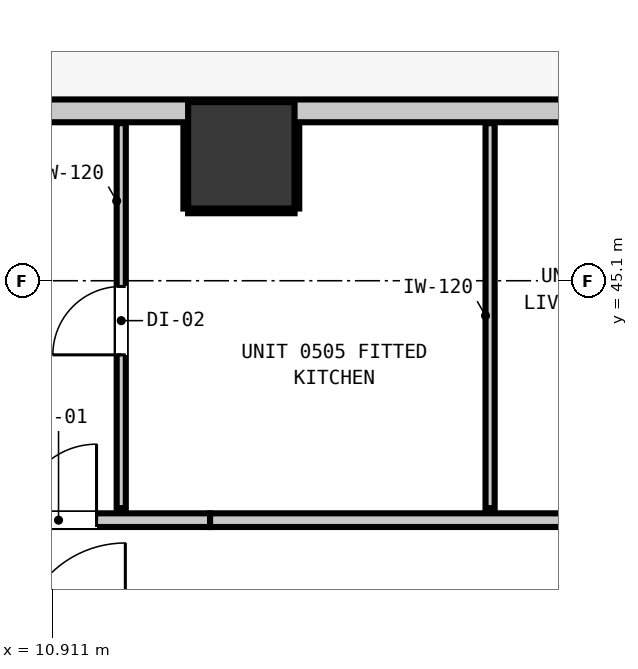
"""IFC4 building model, lengths in metres.
Left out: names, types, materials, properties, quantities, classifications, styles, units other than length and angle.
Written with IfcOpenShell. Run it as: python <this file> out.ifc"""

import sys

from ifc_helpers import new_model, si_unit, direction, frame, frame_2d, origin, origin_2d, place, context, subcontext, project, spatial, rectangle, extrude, element, fill, save


model = new_model("IFC4")
c1 = context("Model", 3, precision=1e-05, world=origin(), true_north=direction((0.0, 1.0)))
c2 = subcontext(c1, "Body", "Model", "MODEL_VIEW")
j1 = project(units=[si_unit("LENGTHUNIT", "METRE"), si_unit("PLANEANGLEUNIT", "RADIAN")], contexts=[c1])
p1 = place(None, origin())
s1 = spatial("IfcSite", under=j1, at=p1, CompositionType="ELEMENT")
p2 = place(p1, origin())
s2 = spatial("IfcBuilding", under=s1, at=p2, CompositionType="ELEMENT")
p3 = place(p2, frame((0.0, 0.0, 22.0)))
s3 = spatial("IfcBuildingStorey", under=s2, at=p3, CompositionType="ELEMENT", Elevation=22.0)
p4 = place(p3, frame((13.4, 46.75, -0.2), z_axis=(0.0, 0.0, 1.0), x_axis=(1.0, 0.0, 0.0)))
e1 = element("IfcColumn", 1, at=p4, inside=s3, PredefinedType="COLUMN", context=c2, shape_type="SweptSolid", body=[
    extrude(rectangle(XDim=1.4, YDim=1.4, at=origin_2d()), origin(), (0.0, 0.0, 1.0), 3.52),
])
p5 = place(p3, frame((4.165, 47.335, 0.0), z_axis=(0.0, 0.0, 1.0), x_axis=(1.0, 0.0, 0.0)))
e2 = element("IfcWall", 2, at=p5, inside=s3, PredefinedType="STANDARD", context=c2, shape_type="SweptSolid", body=[
    extrude(rectangle(XDim=37.47, YDim=0.3, at=frame_2d((18.735, 0.0))), origin(), (0.0, 0.0, 1.0), 3.06),
])
p6 = place(p5, frame((0.501, 0.0, 0.0)))
e3 = element("IfcOpeningElement", 3, at=p6, cuts=e2, PredefinedType="OPENING", context=c2, shape_type="SweptSolid", body=[
    extrude(rectangle(XDim=1.1, YDim=2.15, at=frame_2d((0.55, 1.075))), frame((0.0, 0.16, 0.0), z_axis=(0.0, -1.0, 0.0), x_axis=(1.0, 0.0, 0.0)), (0.0, 0.0, 1.0), 0.32),
])
p7 = place(p5, frame((4.543, 0.0, 0.85)))
e4 = element("IfcOpeningElement", 4, at=p7, cuts=e2, PredefinedType="OPENING", context=c2, shape_type="SweptSolid", body=[
    extrude(rectangle(XDim=1.05, YDim=1.65, at=frame_2d((0.525, 0.825))), frame((0.0, 0.16, 0.0), z_axis=(0.0, -1.0, 0.0), x_axis=(1.0, 0.0, 0.0)), (0.0, 0.0, 1.0), 0.32),
])
p8 = place(p5, frame((13.746, 0.0, 0.85)))
e5 = element("IfcOpeningElement", 5, at=p8, cuts=e2, PredefinedType="OPENING", context=c2, shape_type="SweptSolid", body=[
    extrude(rectangle(XDim=1.05, YDim=1.65, at=frame_2d((0.525, 0.825))), frame((0.0, 0.16, 0.0), z_axis=(0.0, -1.0, 0.0), x_axis=(1.0, 0.0, 0.0)), (0.0, 0.0, 1.0), 0.32),
])
p9 = place(p5, frame((29.575, 0.0, 0.85)))
e6 = element("IfcOpeningElement", 6, at=p9, cuts=e2, PredefinedType="OPENING", context=c2, shape_type="SweptSolid", body=[
    extrude(rectangle(XDim=1.05, YDim=1.65, at=frame_2d((0.525, 0.825))), frame((0.0, 0.16, 0.0), z_axis=(0.0, -1.0, 0.0), x_axis=(1.0, 0.0, 0.0)), (0.0, 0.0, 1.0), 0.32),
])
p10 = place(p5, frame((26.524, 0.0, 0.85)))
e7 = element("IfcOpeningElement", 7, at=p10, cuts=e2, PredefinedType="OPENING", context=c2, shape_type="SweptSolid", body=[
    extrude(rectangle(XDim=1.05, YDim=1.65, at=frame_2d((0.525, 0.825))), frame((0.0, 0.16, 0.0), z_axis=(0.0, -1.0, 0.0), x_axis=(1.0, 0.0, 0.0)), (0.0, 0.0, 1.0), 0.32),
])
p11 = place(p3, frame((2.661, 41.95, 0.0), z_axis=(0.0, 0.0, 1.0), x_axis=(1.0, 0.0, 0.0)))
e8 = element("IfcWall", 8, at=p11, inside=s3, PredefinedType="PARTITIONING", context=c2, shape_type="SweptSolid", body=[
    extrude(rectangle(XDim=10.328, YDim=0.18, at=frame_2d((5.164, 0.0))), origin(), (0.0, 0.0, 1.0), 2.445),
])
p12 = place(p11, frame((7.834, 0.0, 0.0)))
e9 = element("IfcOpeningElement", 9, at=p12, cuts=e8, PredefinedType="OPENING", context=c2, shape_type="SweptSolid", body=[
    extrude(rectangle(XDim=1.0, YDim=2.15, at=frame_2d((0.5, 1.075))), frame((0.0, 0.1, 0.0), z_axis=(0.0, -1.0, 0.0), x_axis=(1.0, 0.0, 0.0)), (0.0, 0.0, 1.0), 0.2),
])
p13 = place(p3, frame((12.989, 41.95, 0.0), z_axis=(0.0, 0.0, 1.0), x_axis=(1.0, 0.0, 0.0)))
e10 = element("IfcWall", 10, at=p13, inside=s3, PredefinedType="PARTITIONING", context=c2, shape_type="SweptSolid", body=[
    extrude(rectangle(XDim=30.984, YDim=0.18, at=frame_2d((15.492, 0.0))), origin(), (0.0, 0.0, 1.0), 3.06),
])
p14 = place(p13, frame((6.307, 0.0, 0.0)))
e11 = element("IfcOpeningElement", 11, at=p14, cuts=e10, PredefinedType="OPENING", context=c2, shape_type="SweptSolid", body=[
    extrude(rectangle(XDim=1.0, YDim=2.15, at=frame_2d((0.5, 1.075))), frame((0.0, 0.1, 0.0), z_axis=(0.0, -1.0, 0.0), x_axis=(1.0, 0.0, 0.0)), (0.0, 0.0, 1.0), 0.2),
])
p15 = place(p13, frame((22.601, 0.0, 0.0)))
e12 = element("IfcOpeningElement", 12, at=p15, cuts=e10, PredefinedType="OPENING", context=c2, shape_type="SweptSolid", body=[
    extrude(rectangle(XDim=1.0, YDim=2.15, at=frame_2d((0.5, 1.075))), frame((0.0, 0.1, 0.0), z_axis=(0.0, -1.0, 0.0), x_axis=(1.0, 0.0, 0.0)), (0.0, 0.0, 1.0), 0.2),
])
p16 = place(p3, frame((11.82, 42.108, 0.0), z_axis=(0.0, 0.0, 1.0), x_axis=(0.0, 1.0, 0.0)))
e13 = element("IfcWall", 13, at=p16, inside=s3, PredefinedType="PARTITIONING", context=c2, shape_type="SweptSolid", body=[
    extrude(rectangle(XDim=5.065, YDim=0.12, at=frame_2d((2.533, 0.0))), origin(), (0.0, 0.0, 1.0), 3.06),
])
p17 = place(p16, frame((2.017, 0.0, 0.0)))
e14 = element("IfcOpeningElement", 14, at=p17, cuts=e13, PredefinedType="OPENING", context=c2, shape_type="SweptSolid", body=[
    extrude(rectangle(XDim=0.9, YDim=2.1, at=frame_2d((0.45, 1.05))), frame((0.0, 0.07, 0.0), z_axis=(0.0, -1.0, 0.0), x_axis=(1.0, 0.0, 0.0)), (0.0, 0.0, 1.0), 0.14),
])
p18 = place(p3, frame((16.673, 42.108, 0.0), z_axis=(0.0, 0.0, 1.0), x_axis=(0.0, 1.0, 0.0)))
e15 = element("IfcWall", 15, at=p18, inside=s3, PredefinedType="PARTITIONING", context=c2, shape_type="SweptSolid", body=[
    extrude(rectangle(XDim=5.065, YDim=0.12, at=frame_2d((2.533, 0.0))), origin(), (0.0, 0.0, 1.0), 3.06),
])
p19 = place(p3, frame((12.7, 46.018, 0.0), z_axis=(0.0, 0.0, 1.0), x_axis=(1.0, 0.0, 0.0)))
e16 = element("IfcWall", 16, at=p19, inside=s3, PredefinedType="PARTITIONING", context=c2, shape_type="SweptSolid", body=[
    extrude(rectangle(XDim=1.4, YDim=0.06, at=frame_2d((0.7, 0.0))), origin(), (0.0, 0.0, 1.0), 1.45),
])
for number, where, z_axis, x_axis in (
    (17, (12.668, 46.05, 0.0), (0.0, 0.0, 1.0), (0.0, 1.0, 0.0)),
    (18, (14.132, 46.05, 0.0), (0.0, 0.0, 1.0), (0.0, 1.0, 0.0)),
):
    element("IfcWall", number, at=place(p3, frame(where, z_axis=z_axis, x_axis=x_axis)), inside=s3, PredefinedType="PARTITIONING", context=c2, shape_type="SweptSolid", body=[
        extrude(rectangle(XDim=1.12, YDim=0.06, at=frame_2d((0.56, 0.0))), origin(), (0.0, 0.0, 1.0), 1.45),
    ])
p20 = place(p12, origin())
e19 = element("IfcDoor", 19, at=p20, inside=s3, OperationType="SINGLE_SWING_RIGHT", PredefinedType="DOOR", context=c2, shape_type="SweptSolid", body=[
    extrude(rectangle(XDim=1.0, YDim=2.15, at=frame_2d((0.5, 1.075))), frame((0.0, 0.025, 0.0), z_axis=(0.0, -1.0, 0.0), x_axis=(1.0, 0.0, 0.0)), (0.0, 0.0, 1.0), 0.05),
])
fill(e9, e19)
p21 = place(p17, origin())
e20 = element("IfcDoor", 20, at=p21, inside=s3, OperationType="SINGLE_SWING_LEFT", PredefinedType="DOOR", context=c2, shape_type="SweptSolid", body=[
    extrude(rectangle(XDim=0.9, YDim=2.1, at=frame_2d((0.45, 1.05))), frame((0.0, 0.025, 0.0), z_axis=(0.0, -1.0, 0.0), x_axis=(1.0, 0.0, 0.0)), (0.0, 0.0, 1.0), 0.05),
])
fill(e14, e20)
save(model, sys.argv[1])
